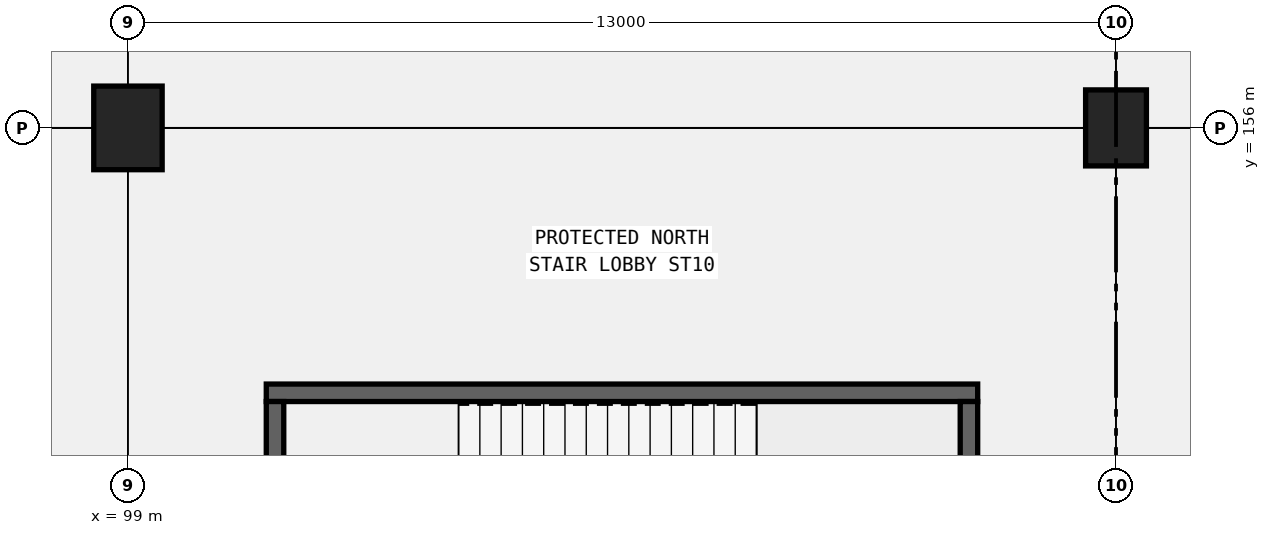
"""IFC4 building model, lengths in metres.
Left out: names, types, materials, properties, quantities, classifications, styles, units other than length and angle.
Written with IfcOpenShell. Run it as: python <this file> out.ifc"""

import sys

from ifc_helpers import new_model, si_unit, direction, frame, frame_2d, origin, origin_2d, place, context, subcontext, project, spatial, rectangle, extrude, element, save


model = new_model("IFC4")
c1 = context("Model", 3, precision=1e-05, world=origin(), true_north=direction((0.0, 1.0)))
c2 = subcontext(c1, "Body", "Model", "MODEL_VIEW")
j1 = project(units=[si_unit("LENGTHUNIT", "METRE"), si_unit("PLANEANGLEUNIT", "RADIAN")], contexts=[c1])
p1 = place(None, origin())
s1 = spatial("IfcSite", under=j1, at=p1, CompositionType="ELEMENT")
p2 = place(p1, origin())
s2 = spatial("IfcBuilding", under=s1, at=p2, CompositionType="ELEMENT")
p3 = place(p2, frame((0.0, 0.0, -4.8)))
s3 = spatial("IfcBuildingStorey", under=s2, at=p3, CompositionType="ELEMENT", Elevation=-4.8)
p4 = place(p3, frame((99.0, 156.0, 0.0), z_axis=(0.0, 0.0, 1.0), x_axis=(1.0, 0.0, 0.0)))
e1 = element("IfcColumn", 1, at=p4, inside=s3, PredefinedType="COLUMN", context=c2, shape_type="SweptSolid", body=[
    extrude(rectangle(XDim=0.9, YDim=1.1, at=origin_2d()), origin(), (0.0, 0.0, 1.0), 4.8),
])
p5 = place(p3, frame((112.0, 156.0, 0.0), z_axis=(0.0, 0.0, 1.0), x_axis=(1.0, 0.0, 0.0)))
e2 = element("IfcColumn", 2, at=p5, inside=s3, PredefinedType="COLUMN", context=c2, shape_type="SweptSolid", body=[
    extrude(rectangle(XDim=0.8, YDim=1.0, at=origin_2d()), origin(), (0.0, 0.0, 1.0), 4.8),
])
p6 = place(p3, frame((100.82, 152.515, 0.0), z_axis=(0.0, 0.0, 1.0), x_axis=(1.0, 0.0, 0.0)))
e3 = element("IfcWall", 3, at=p6, inside=s3, PredefinedType="SHEAR", context=c2, shape_type="SweptSolid", body=[
    extrude(rectangle(XDim=9.36, YDim=0.23, at=frame_2d((4.68, 0.0))), origin(), (0.0, 0.0, 1.0), 4.5),
])
for number, where, z_axis, x_axis in (
    (4, (100.935, 147.6, 0.0), (0.0, 0.0, 1.0), (0.0, 1.0, 0.0)),
    (5, (110.065, 147.6, 0.0), (0.0, 0.0, 1.0), (0.0, 1.0, 0.0)),
):
    element("IfcWall", number, at=place(p3, frame(where, z_axis=z_axis, x_axis=x_axis)), inside=s3, PredefinedType="SHEAR", context=c2, shape_type="SweptSolid", body=[
        extrude(rectangle(XDim=4.8, YDim=0.23, at=frame_2d((2.4, 0.0))), origin(), (0.0, 0.0, 1.0), 4.5),
    ])
save(model, sys.argv[1])
